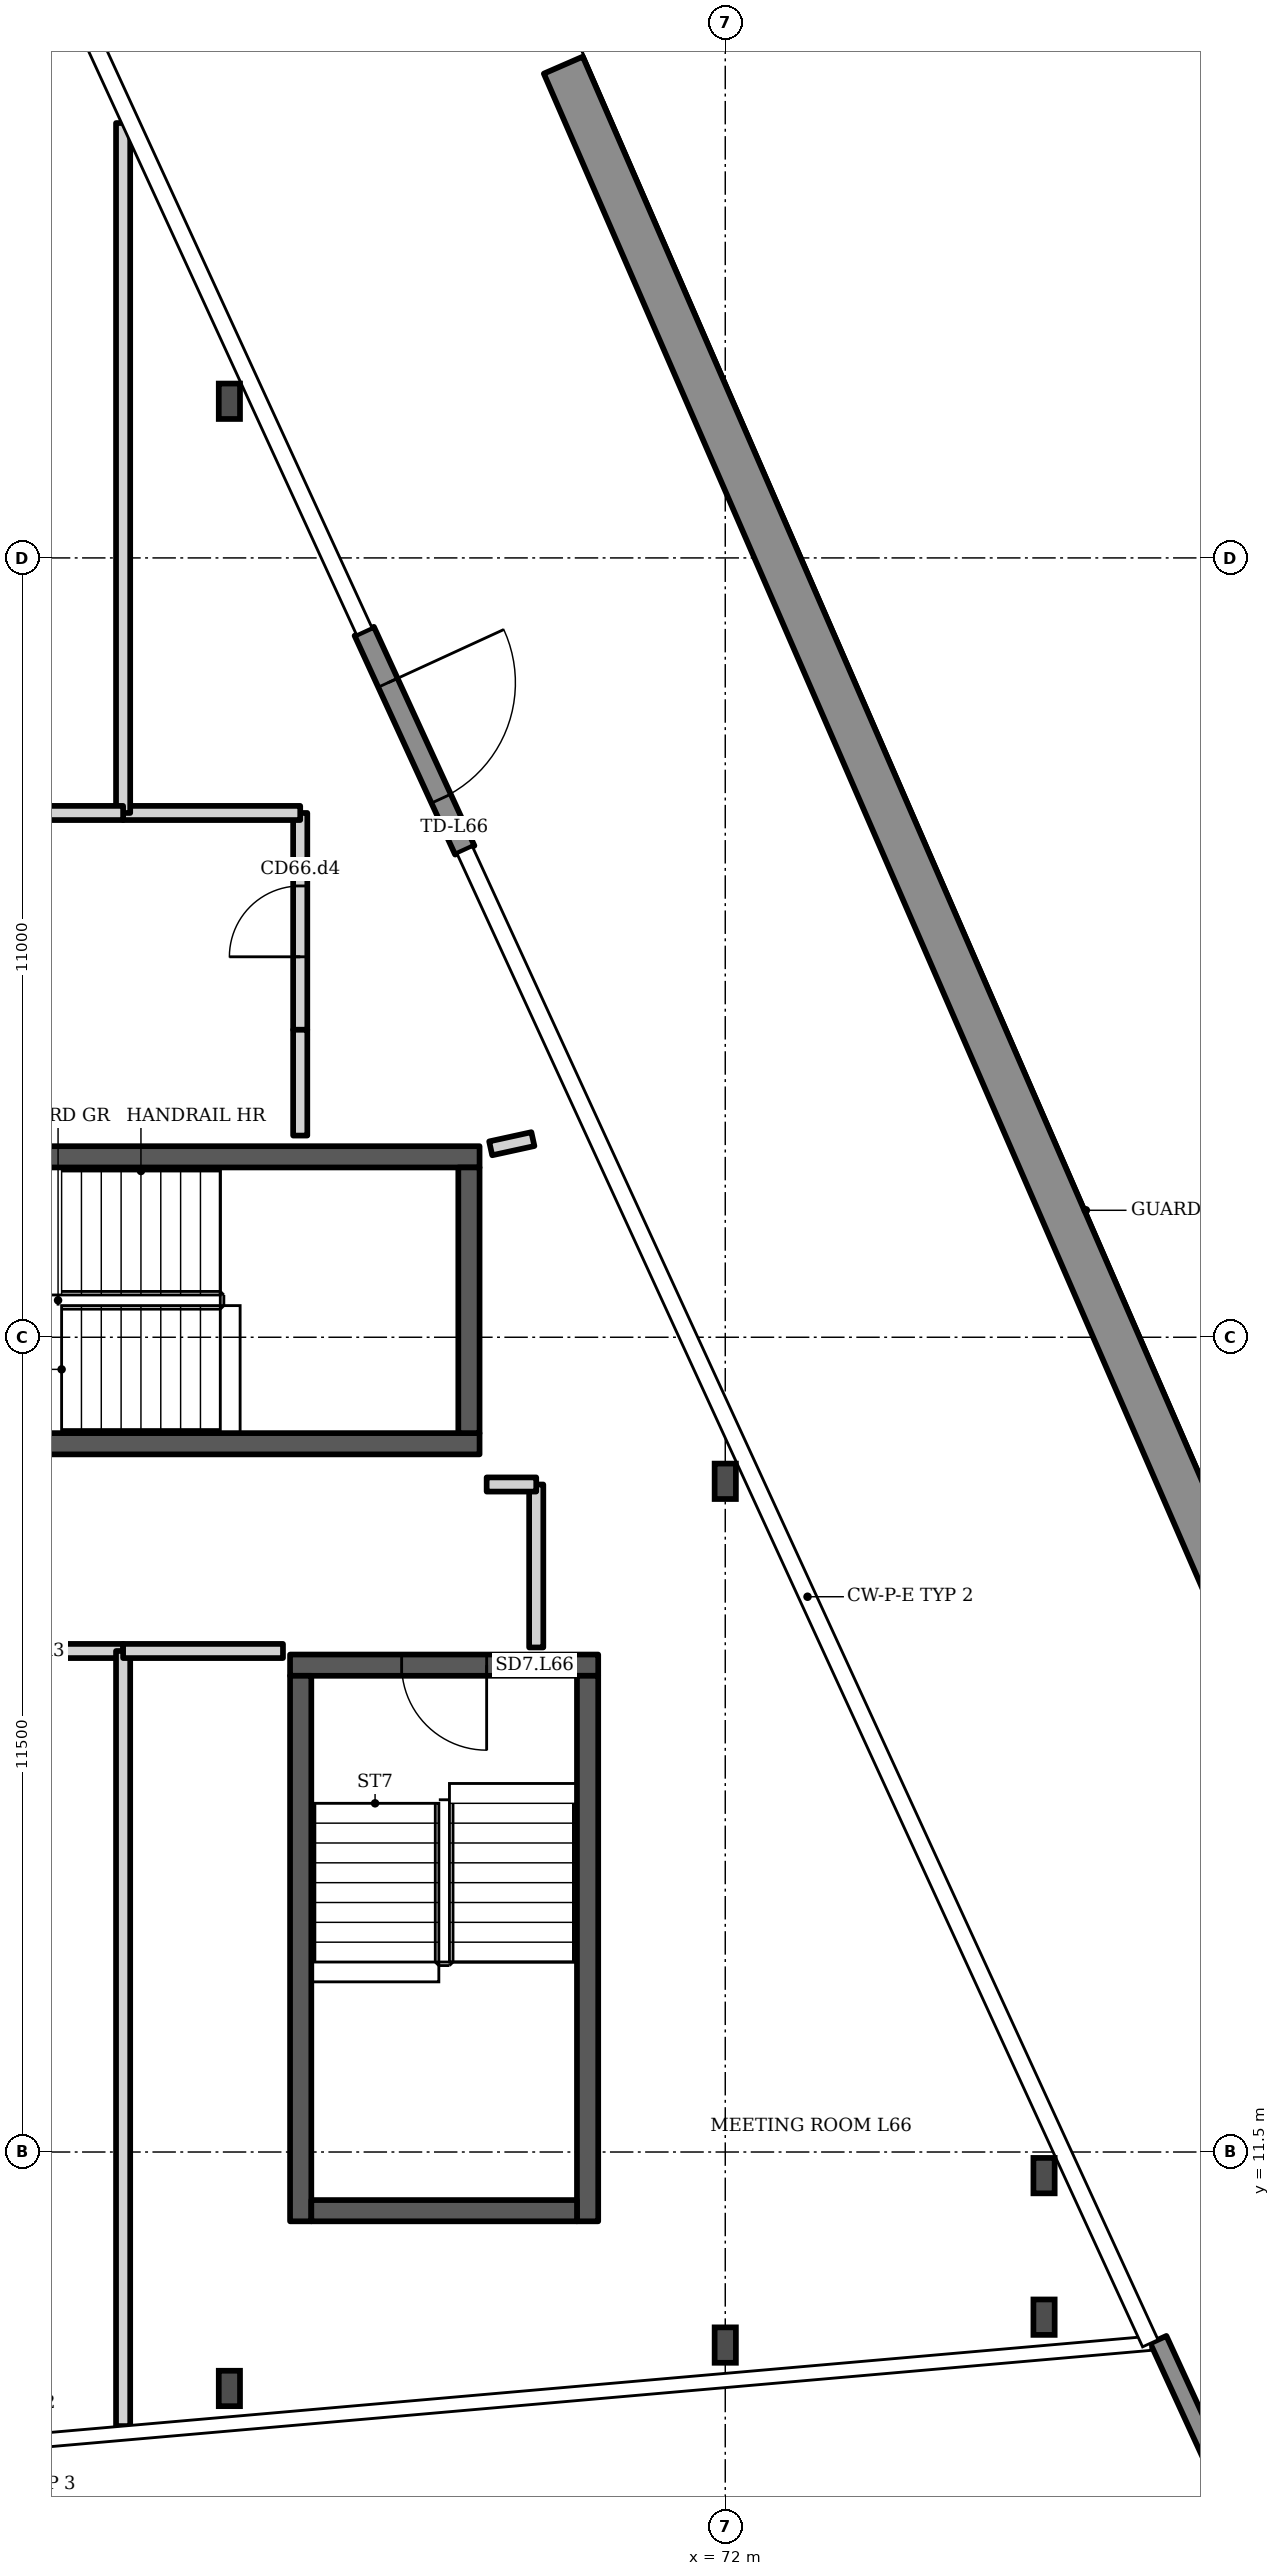
"""IFC4 building model, lengths in metres.
Left out: names, types, materials, properties, quantities, classifications, styles, units other than length and angle.
Written with IfcOpenShell. Run it as: python <this file> out.ifc"""

import sys

from ifc_helpers import new_model, si_unit, direction, frame, frame_2d, origin, origin_2d, place, context, subcontext, project, spatial, rectangle, i_section, extrude, element, fill, save


model = new_model("IFC4")
c1 = context("Model", 3, precision=1e-05, world=origin(), true_north=direction((0.0, 1.0)))
c2 = subcontext(c1, "Body", "Model", "MODEL_VIEW")
j1 = project(units=[si_unit("LENGTHUNIT", "METRE"), si_unit("PLANEANGLEUNIT", "RADIAN")], contexts=[c1])
p1 = place(None, origin())
s1 = spatial("IfcSite", under=j1, at=p1, CompositionType="ELEMENT")
p2 = place(p1, origin())
s2 = spatial("IfcBuilding", under=s1, at=p2, CompositionType="ELEMENT")
p3 = place(p2, frame((0.0, 0.0, 261.1)))
s3 = spatial("IfcBuildingStorey", under=s2, at=p3, CompositionType="ELEMENT", Elevation=261.1)
for number, where, z_axis, x_axis in (
    (1, (65.0, 8.163, 0.0), (0.0, 0.0, 1.0), (1.0, 0.0, 0.0)),
    (2, (65.0, 36.211, 0.0), (0.0, 0.0, 1.0), (1.0, 0.0, 0.0)),
    (3, (72.0, 8.775, 0.0), (0.0, 0.0, 1.0), (1.0, 0.0, 0.0)),
    (4, (72.0, 20.967, 0.0), (0.0, 0.0, 1.0), (1.0, 0.0, 0.0)),
    (5, (76.5, 9.169, 0.0), (0.0, 0.0, 1.0), (1.0, 0.0, 0.0)),
    (6, (76.5, 11.167, 0.0), (0.0, 0.0, 1.0), (1.0, 0.0, 0.0)),
):
    element("IfcColumn", number, at=place(p3, frame(where, z_axis=z_axis, x_axis=x_axis)), inside=s3, PredefinedType="COLUMN", context=c2, shape_type="SweptSolid", body=[
        extrude(i_section(OverallWidth=0.3, OverallDepth=0.5, WebThickness=0.014, FlangeThickness=0.028, FilletRadius=0.027, at=origin_2d()), origin(), (0.0, 0.0, 1.0), 3.2),
    ])
p4 = place(p3, frame((78.114, 8.852, 0.0), z_axis=(0.0, 0.0, 1.0), x_axis=(0.417352, -0.908745, 0.0)))
e7 = element("IfcWall", 7, at=p4, inside=s3, PredefinedType="PARAPET", context=c2, shape_type="SweptSolid", body=[
    extrude(rectangle(XDim=2.978, YDim=0.25, at=frame_2d((1.489, 0.0))), origin(), (0.0, 0.0, 1.0), 1.1),
])
p5 = place(p3, frame((69.714, 40.955, 0.0), z_axis=(0.0, 0.0, 1.0), x_axis=(0.398728, -0.917067, 0.0)))
e8 = element("IfcWall", 8, at=p5, inside=s3, PredefinedType="SOLIDWALL", context=c2, shape_type="SweptSolid", body=[
    extrude(rectangle(XDim=36.601, YDim=0.6, at=frame_2d((18.301, 0.0))), origin(), (0.0, 0.0, 1.0), 0.8),
])
p6 = place(p3, frame((58.4, 18.572, 0.0), z_axis=(0.0, 0.0, 1.0), x_axis=(1.0, 0.0, 0.0)))
e9 = element("IfcWall", 9, at=p6, inside=s3, PredefinedType="PARTITIONING", context=c2, shape_type="SweptSolid", body=[
    extrude(rectangle(XDim=5.1, YDim=0.2, at=frame_2d((2.55, 0.0))), origin(), (0.0, 0.0, 1.0), 2.8),
])
p7 = place(p6, frame((2.05, 0.0, 0.0)))
e10 = element("IfcOpeningElement", 10, at=p7, cuts=e9, PredefinedType="OPENING", context=c2, shape_type="SweptSolid", body=[
    extrude(rectangle(XDim=1.0, YDim=2.1, at=frame_2d((0.5, 1.05))), frame((0.0, 0.11, 0.0), z_axis=(0.0, -1.0, 0.0), x_axis=(1.0, 0.0, 0.0)), (0.0, 0.0, 1.0), 0.22),
])
p8 = place(p3, frame((63.5, 18.572, 0.0), z_axis=(0.0, 0.0, 1.0), x_axis=(0.0, -1.0, 0.0)))
e11 = element("IfcWall", 11, at=p8, inside=s3, PredefinedType="PARTITIONING", context=c2, shape_type="SweptSolid", body=[
    extrude(rectangle(XDim=10.94, YDim=0.2, at=frame_2d((5.47, 0.0))), origin(), (0.0, 0.0, 1.0), 2.8),
])
p9 = place(p3, frame((69.332, 18.622, 0.0), z_axis=(0.0, 0.0, 1.0), x_axis=(0.0, 1.0, 0.0)))
e12 = element("IfcWall", 12, at=p9, inside=s3, PredefinedType="PARTITIONING", context=c2, shape_type="SweptSolid", body=[
    extrude(rectangle(XDim=2.3, YDim=0.2, at=frame_2d((1.15, 0.0))), origin(), (0.0, 0.0, 1.0), 2.8),
])
p10 = place(p3, frame((69.332, 20.922, 0.0), z_axis=(0.0, 0.0, 1.0), x_axis=(-1.0, 0.0, 0.0)))
e13 = element("IfcWall", 13, at=p10, inside=s3, PredefinedType="PARTITIONING", context=c2, shape_type="SweptSolid", body=[
    extrude(rectangle(XDim=0.7, YDim=0.2, at=frame_2d((0.35, 0.0))), origin(), (0.0, 0.0, 1.0), 2.8),
])
p11 = place(p3, frame((66.0, 27.34, 0.0), z_axis=(0.0, 0.0, 1.0), x_axis=(0.0, 1.0, 0.0)))
e14 = element("IfcWall", 14, at=p11, inside=s3, PredefinedType="PARTITIONING", context=c2, shape_type="SweptSolid", body=[
    extrude(rectangle(XDim=3.06, YDim=0.2, at=frame_2d((1.53, 0.0))), origin(), (0.0, 0.0, 1.0), 2.8),
])
p12 = place(p11, frame((1.03, 0.0, 0.0)))
e15 = element("IfcOpeningElement", 15, at=p12, cuts=e14, PredefinedType="OPENING", context=c2, shape_type="SweptSolid", body=[
    extrude(rectangle(XDim=1.0, YDim=2.1, at=frame_2d((0.5, 1.05))), frame((0.0, 0.11, 0.0), z_axis=(0.0, -1.0, 0.0), x_axis=(1.0, 0.0, 0.0)), (0.0, 0.0, 1.0), 0.22),
])
p13 = place(p3, frame((66.0, 30.4, 0.0), z_axis=(0.0, 0.0, 1.0), x_axis=(-1.0, 0.0, 0.0)))
e16 = element("IfcWall", 16, at=p13, inside=s3, PredefinedType="PARTITIONING", context=c2, shape_type="SweptSolid", body=[
    extrude(rectangle(XDim=2.5, YDim=0.2, at=frame_2d((1.25, 0.0))), origin(), (0.0, 0.0, 1.0), 2.8),
])
p14 = place(p3, frame((63.5, 18.572, 0.0), z_axis=(0.0, 0.0, 1.0), x_axis=(1.0, 0.0, 0.0)))
e17 = element("IfcWall", 17, at=p14, inside=s3, PredefinedType="PARTITIONING", context=c2, shape_type="SweptSolid", body=[
    extrude(rectangle(XDim=2.257, YDim=0.2, at=frame_2d((1.128, 0.0))), origin(), (0.0, 0.0, 1.0), 2.8),
])
p15 = place(p3, frame((63.5, 30.4, 0.0), z_axis=(0.0, 0.0, 1.0), x_axis=(0.0, 1.0, 0.0)))
e18 = element("IfcWall", 18, at=p15, inside=s3, PredefinedType="PARTITIONING", context=c2, shape_type="SweptSolid", body=[
    extrude(rectangle(XDim=9.738, YDim=0.2, at=frame_2d((4.869, 0.0))), origin(), (0.0, 0.0, 1.0), 2.8),
])
p16 = place(p3, frame((63.5, 30.4, 0.0), z_axis=(0.0, 0.0, 1.0), x_axis=(-1.0, 0.0, 0.0)))
e19 = element("IfcWall", 19, at=p16, inside=s3, PredefinedType="PARTITIONING", context=c2, shape_type="SweptSolid", body=[
    extrude(rectangle(XDim=5.4, YDim=0.2, at=frame_2d((2.7, 0.0))), origin(), (0.0, 0.0, 1.0), 2.8),
])
p17 = place(p16, frame((2.2, 0.0, 0.0)))
e20 = element("IfcOpeningElement", 20, at=p17, cuts=e19, PredefinedType="OPENING", context=c2, shape_type="SweptSolid", body=[
    extrude(rectangle(XDim=1.0, YDim=2.1, at=frame_2d((0.5, 1.05))), frame((0.0, 0.11, 0.0), z_axis=(0.0, -1.0, 0.0), x_axis=(1.0, 0.0, 0.0)), (0.0, 0.0, 1.0), 0.22),
])
p18 = place(p3, frame((68.689, 25.667, 0.0), z_axis=(0.0, 0.0, 1.0), x_axis=(0.976941, 0.213493, 0.0)))
e21 = element("IfcWall", 21, at=p18, inside=s3, PredefinedType="PARTITIONING", context=c2, shape_type="SweptSolid", body=[
    extrude(rectangle(XDim=0.61, YDim=0.2, at=frame_2d((0.305, 0.0))), origin(), (0.0, 0.0, 1.0), 2.8),
])
p19 = place(p3, frame((66.0, 25.847, 0.0), z_axis=(0.0, 0.0, 1.0), x_axis=(0.0, 1.0, 0.0)))
e22 = element("IfcWall", 22, at=p19, inside=s3, PredefinedType="PARTITIONING", context=c2, shape_type="SweptSolid", body=[
    extrude(rectangle(XDim=1.493, YDim=0.2, at=frame_2d((0.747, 0.0))), origin(), (0.0, 0.0, 1.0), 2.8),
])
p20 = place(p3, frame((65.857, 18.372, 0.0), z_axis=(0.0, 0.0, 1.0), x_axis=(1.0, 0.0, 0.0)))
e23 = element("IfcWall", 23, at=p20, inside=s3, PredefinedType="SHEAR", context=c2, shape_type="SweptSolid", body=[
    extrude(rectangle(XDim=4.35, YDim=0.3, at=frame_2d((2.175, 0.0))), origin(), (0.0, 0.0, 1.0), 2.8),
])
p21 = place(p20, frame((1.575, 0.0, 0.0)))
e24 = element("IfcOpeningElement", 24, at=p21, cuts=e23, PredefinedType="OPENING", context=c2, shape_type="SweptSolid", body=[
    extrude(rectangle(XDim=1.2, YDim=2.1, at=frame_2d((0.6, 1.05))), frame((0.0, 0.16, 0.0), z_axis=(0.0, -1.0, 0.0), x_axis=(1.0, 0.0, 0.0)), (0.0, 0.0, 1.0), 0.32),
])
p22 = place(p3, frame((66.904, 32.965, 0.0), z_axis=(0.0, 0.0, 1.0), x_axis=(0.417326, -0.908754, 0.0)))
e25 = element("IfcWall", 25, at=p22, inside=s3, PredefinedType="SOLIDWALL", context=c2, shape_type="SweptSolid", body=[
    extrude(rectangle(XDim=3.4, YDim=0.3, at=frame_2d((1.7, 0.0))), origin(), (0.0, 0.0, 1.0), 2.8),
])
p23 = place(p22, frame((0.8, 0.0, 0.0)))
e26 = element("IfcOpeningElement", 26, at=p23, cuts=e25, PredefinedType="OPENING", context=c2, shape_type="SweptSolid", body=[
    extrude(rectangle(XDim=1.8, YDim=2.1, at=frame_2d((0.9, 1.05))), frame((0.0, 0.16, 0.0), z_axis=(0.0, -1.0, 0.0), x_axis=(1.0, 0.0, 0.0)), (0.0, 0.0, 1.0), 0.32),
])
for number, where, z_axis, x_axis in (
    (27, (66.007, 10.522, 0.0), (0.0, 0.0, 1.0), (0.0, 1.0, 0.0)),
    (28, (70.057, 10.522, 0.0), (0.0, 0.0, 1.0), (0.0, 1.0, 0.0)),
):
    element("IfcWall", number, at=place(p3, frame(where, z_axis=z_axis, x_axis=x_axis)), inside=s3, PredefinedType="SHEAR", context=c2, shape_type="SweptSolid", body=[
        extrude(rectangle(XDim=7.7, YDim=0.3, at=frame_2d((3.85, 0.0))), origin(), (0.0, 0.0, 1.0), 2.8),
    ])
p24 = place(p3, frame((66.156, 10.672, 0.0), z_axis=(0.0, 0.0, 1.0), x_axis=(1.0, 0.0, 0.0)))
e29 = element("IfcWall", 29, at=p24, inside=s3, PredefinedType="SHEAR", context=c2, shape_type="SweptSolid", body=[
    extrude(rectangle(XDim=3.75, YDim=0.3, at=frame_2d((1.875, 0.0))), origin(), (0.0, 0.0, 1.0), 2.8),
])
for number, where, z_axis, x_axis in (
    (30, (60.832, 21.497, 0.0), (0.0, 0.0, 1.0), (1.0, 0.0, 0.0)),
    (31, (60.832, 25.547, 0.0), (0.0, 0.0, 1.0), (1.0, 0.0, 0.0)),
):
    element("IfcWall", number, at=place(p3, frame(where, z_axis=z_axis, x_axis=x_axis)), inside=s3, PredefinedType="SHEAR", context=c2, shape_type="SweptSolid", body=[
        extrude(rectangle(XDim=7.7, YDim=0.3, at=frame_2d((3.85, 0.0))), origin(), (0.0, 0.0, 1.0), 2.8),
    ])
p25 = place(p3, frame((68.382, 21.647, 0.0), z_axis=(0.0, 0.0, 1.0), x_axis=(0.0, 1.0, 0.0)))
e32 = element("IfcWall", 32, at=p25, inside=s3, PredefinedType="SHEAR", context=c2, shape_type="SweptSolid", body=[
    extrude(rectangle(XDim=3.75, YDim=0.3, at=frame_2d((1.875, 0.0))), origin(), (0.0, 0.0, 1.0), 2.8),
])
p26 = place(p12, origin())
e33 = element("IfcDoor", 33, at=p26, inside=s3, OperationType="SINGLE_SWING_LEFT", PredefinedType="DOOR", context=c2, shape_type="SweptSolid", body=[
    extrude(rectangle(XDim=1.0, YDim=2.1, at=frame_2d((0.5, 1.05))), frame((0.0, 0.025, 0.0), z_axis=(0.0, -1.0, 0.0), x_axis=(1.0, 0.0, 0.0)), (0.0, 0.0, 1.0), 0.05),
])
fill(e15, e33)
p27 = place(p21, origin())
e34 = element("IfcDoor", 34, at=p27, inside=s3, OperationType="SINGLE_SWING_RIGHT", PredefinedType="DOOR", context=c2, shape_type="SweptSolid", body=[
    extrude(rectangle(XDim=1.2, YDim=2.1, at=frame_2d((0.6, 1.05))), frame((0.0, 0.025, 0.0), z_axis=(0.0, -1.0, 0.0), x_axis=(1.0, 0.0, 0.0)), (0.0, 0.0, 1.0), 0.05),
])
fill(e24, e34)
p28 = place(p23, origin())
e35 = element("IfcDoor", 35, at=p28, inside=s3, OperationType="DOUBLE_DOOR_SINGLE_SWING", PredefinedType="DOOR", context=c2, shape_type="SweptSolid", body=[
    extrude(rectangle(XDim=1.8, YDim=2.1, at=frame_2d((0.9, 1.05))), frame((0.0, 0.025, 0.0), z_axis=(0.0, -1.0, 0.0), x_axis=(1.0, 0.0, 0.0)), (0.0, 0.0, 1.0), 0.05),
])
fill(e26, e35)
save(model, sys.argv[1])
